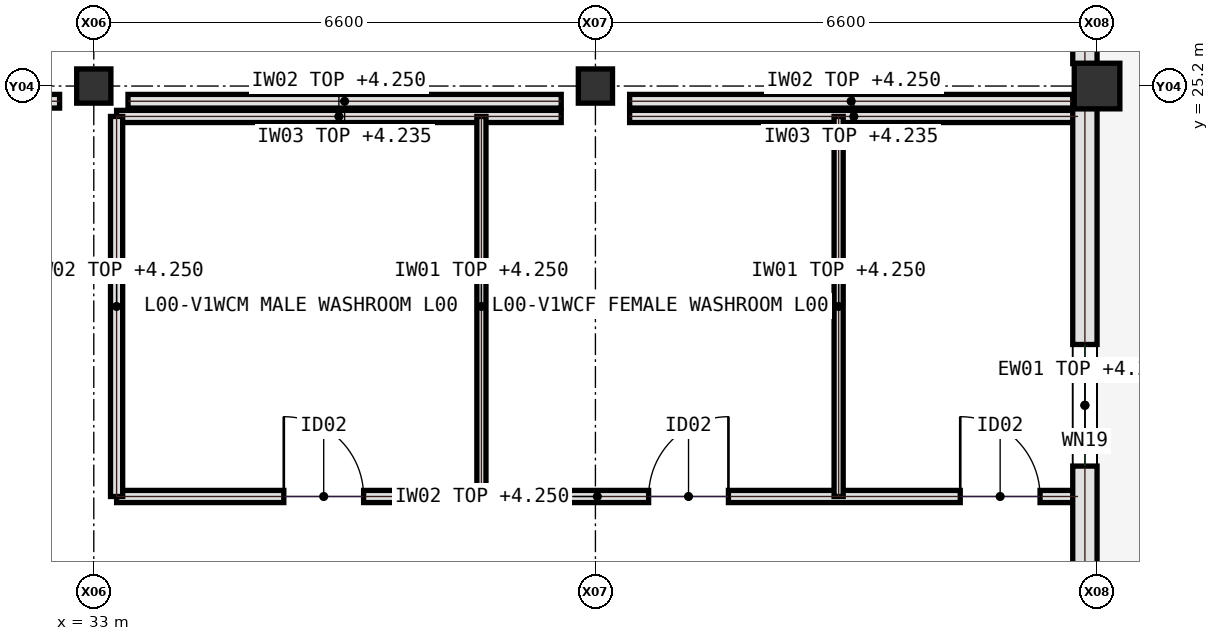
"""IFC4 building model, lengths in metres.
Left out: names, types, materials, properties, quantities, classifications, styles, units other than length and angle.
Written with IfcOpenShell. Run it as: python <this file> out.ifc"""

import sys

from ifc_helpers import new_model, si_unit, direction, frame, frame_2d, origin, origin_2d, place, context, subcontext, project, spatial, rectangle, extrude, element, fill, save


model = new_model("IFC4")
c1 = context("Model", 3, precision=1e-05, world=origin(), true_north=direction((0.0, 1.0)))
c2 = subcontext(c1, "Body", "Model", "MODEL_VIEW")
j1 = project(units=[si_unit("LENGTHUNIT", "METRE"), si_unit("PLANEANGLEUNIT", "RADIAN")], contexts=[c1])
p1 = place(None, origin())
s1 = spatial("IfcSite", under=j1, at=p1, CompositionType="ELEMENT")
p2 = place(p1, origin())
s2 = spatial("IfcBuilding", under=s1, at=p2, CompositionType="ELEMENT")
p3 = place(p2, origin())
s3 = spatial("IfcBuildingStorey", under=s2, at=p3, CompositionType="ELEMENT", Elevation=0.0)
for number, where, z_axis, x_axis in (
    (1, (33.0, 25.2, 0.0), (0.0, 0.0, 1.0), (1.0, 0.0, 0.0)),
    (2, (39.6, 25.2, 0.0), (0.0, 0.0, 1.0), (1.0, 0.0, 0.0)),
):
    element("IfcColumn", number, at=place(p3, frame(where, z_axis=z_axis, x_axis=x_axis)), inside=s3, PredefinedType="COLUMN", context=c2, shape_type="SweptSolid", body=[
        extrude(rectangle(XDim=0.45, YDim=0.45, at=origin_2d()), origin(), (0.0, 0.0, 1.0), 5.4),
    ])
p4 = place(p3, frame((46.2, 25.2, 0.0), z_axis=(0.0, 0.0, 1.0), x_axis=(1.0, 0.0, 0.0)))
e3 = element("IfcColumn", 3, at=p4, inside=s3, PredefinedType="COLUMN", context=c2, shape_type="SweptSolid", body=[
    extrude(rectangle(XDim=0.6, YDim=0.6, at=origin_2d()), origin(), (0.0, 0.0, 1.0), 5.4),
])
p5 = place(p3, frame((33.3, 19.8, 0.0), z_axis=(0.0, 0.0, 1.0), x_axis=(1.0, 0.0, 0.0)))
e4 = element("IfcWall", 4, at=p5, inside=s3, PredefinedType="PARTITIONING", context=c2, shape_type="SweptSolid", body=[
    extrude(rectangle(XDim=12.65, YDim=0.16, at=frame_2d((6.325, 0.0))), origin(), (0.0, 0.0, 1.0), 4.25),
])
p6 = place(p5, frame((2.2, 0.0, 0.0)))
e5 = element("IfcOpeningElement", 5, at=p6, cuts=e4, PredefinedType="OPENING", context=c2, shape_type="SweptSolid", body=[
    extrude(rectangle(XDim=1.05, YDim=2.15, at=frame_2d((0.525, 1.075))), frame((0.0, 0.09, 0.0), z_axis=(0.0, -1.0, 0.0), x_axis=(1.0, 0.0, 0.0)), (0.0, 0.0, 1.0), 0.18),
])
p7 = place(p5, frame((7.0, 0.0, 0.0)))
e6 = element("IfcOpeningElement", 6, at=p7, cuts=e4, PredefinedType="OPENING", context=c2, shape_type="SweptSolid", body=[
    extrude(rectangle(XDim=1.05, YDim=2.15, at=frame_2d((0.525, 1.075))), frame((0.0, 0.09, 0.0), z_axis=(0.0, -1.0, 0.0), x_axis=(1.0, 0.0, 0.0)), (0.0, 0.0, 1.0), 0.18),
])
p8 = place(p5, frame((11.1, 0.0, 0.0)))
e7 = element("IfcOpeningElement", 7, at=p8, cuts=e4, PredefinedType="OPENING", context=c2, shape_type="SweptSolid", body=[
    extrude(rectangle(XDim=1.05, YDim=2.15, at=frame_2d((0.525, 1.075))), frame((0.0, 0.09, 0.0), z_axis=(0.0, -1.0, 0.0), x_axis=(1.0, 0.0, 0.0)), (0.0, 0.0, 1.0), 0.18),
])
p9 = place(p3, frame((33.3, 24.8, 0.0), z_axis=(0.0, 0.0, 1.0), x_axis=(1.0, 0.0, 0.0)))
e8 = element("IfcWall", 8, at=p9, inside=s3, PredefinedType="PARTITIONING", context=c2, shape_type="SweptSolid", body=[
    extrude(rectangle(XDim=5.85, YDim=0.16, at=frame_2d((2.925, 0.0))), origin(), (0.0, 0.0, 1.0), 4.25),
])
p10 = place(p3, frame((40.05, 24.8, 0.0), z_axis=(0.0, 0.0, 1.0), x_axis=(1.0, 0.0, 0.0)))
e9 = element("IfcWall", 9, at=p10, inside=s3, PredefinedType="PARTITIONING", context=c2, shape_type="SweptSolid", body=[
    extrude(rectangle(XDim=5.9, YDim=0.16, at=frame_2d((2.95, 0.0))), origin(), (0.0, 0.0, 1.0), 4.25),
])
p11 = place(p3, frame((33.3, 19.8, 0.0), z_axis=(0.0, 0.0, 1.0), x_axis=(0.0, 1.0, 0.0)))
e10 = element("IfcWall", 10, at=p11, inside=s3, PredefinedType="PARTITIONING", context=c2, shape_type="SweptSolid", body=[
    extrude(rectangle(XDim=5.0, YDim=0.16, at=frame_2d((2.5, 0.0))), origin(), (0.0, 0.0, 1.0), 4.25),
])
for number, where, z_axis, x_axis in (
    (11, (38.1, 19.8, 0.0), (0.0, 0.0, 1.0), (0.0, 1.0, 0.0)),
    (12, (42.8, 19.8, 0.0), (0.0, 0.0, 1.0), (0.0, 1.0, 0.0)),
):
    element("IfcWall", number, at=place(p3, frame(where, z_axis=z_axis, x_axis=x_axis)), inside=s3, PredefinedType="PARTITIONING", context=c2, shape_type="SweptSolid", body=[
        extrude(rectangle(XDim=5.0, YDim=0.12, at=frame_2d((2.5, 0.0))), origin(), (0.0, 0.0, 1.0), 4.25),
    ])
p12 = place(p3, frame((26.85, 25.0, 0.0), z_axis=(0.0, 0.0, 1.0), x_axis=(1.0, 0.0, 0.0)))
e13 = element("IfcWall", 13, at=p12, inside=s3, PredefinedType="SOLIDWALL", context=c2, shape_type="SweptSolid", body=[
    extrude(rectangle(XDim=5.7, YDim=0.18, at=frame_2d((2.85, 0.0))), origin(), (0.0, 0.0, 1.0), 4.235),
])
p13 = place(p12, frame((2.9, 0.0, 0.0)))
e14 = element("IfcOpeningElement", 14, at=p13, cuts=e13, PredefinedType="OPENING", context=c2, shape_type="SweptSolid", body=[
    extrude(rectangle(XDim=1.85, YDim=2.25, at=frame_2d((0.925, 1.125))), frame((0.0, 0.1, 0.0), z_axis=(0.0, -1.0, 0.0), x_axis=(1.0, 0.0, 0.0)), (0.0, 0.0, 1.0), 0.2),
])
p14 = place(p3, frame((33.45, 25.0, 0.0), z_axis=(0.0, 0.0, 1.0), x_axis=(1.0, 0.0, 0.0)))
e15 = element("IfcWall", 15, at=p14, inside=s3, PredefinedType="SOLIDWALL", context=c2, shape_type="SweptSolid", body=[
    extrude(rectangle(XDim=5.7, YDim=0.18, at=frame_2d((2.85, 0.0))), origin(), (0.0, 0.0, 1.0), 4.235),
])
p15 = place(p3, frame((40.05, 25.0, 0.0), z_axis=(0.0, 0.0, 1.0), x_axis=(1.0, 0.0, 0.0)))
e16 = element("IfcWall", 16, at=p15, inside=s3, PredefinedType="SOLIDWALL", context=c2, shape_type="SweptSolid", body=[
    extrude(rectangle(XDim=5.83, YDim=0.18, at=frame_2d((2.915, 0.0))), origin(), (0.0, 0.0, 1.0), 4.235),
])
p16 = place(p3, frame((46.04, 17.095, 0.0), z_axis=(0.0, 0.0, 1.0), x_axis=(0.0, 1.0, 0.0)))
e17 = element("IfcWall", 17, at=p16, inside=s3, PredefinedType="SOLIDWALL", context=c2, shape_type="SweptSolid", body=[
    extrude(rectangle(XDim=7.81, YDim=0.32, at=frame_2d((3.905, 0.0))), origin(), (0.0, 0.0, 1.0), 4.335),
])
p17 = place(p16, frame((3.105, 0.0, 0.95)))
e18 = element("IfcOpeningElement", 18, at=p17, cuts=e17, PredefinedType="OPENING", context=c2, shape_type="SweptSolid", body=[
    extrude(rectangle(XDim=1.6, YDim=1.85, at=frame_2d((0.8, 0.925))), frame((0.0, 0.17, 0.0), z_axis=(0.0, -1.0, 0.0), x_axis=(1.0, 0.0, 0.0)), (0.0, 0.0, 1.0), 0.34),
])
p18 = place(p3, frame((46.04, 25.495, 0.0), z_axis=(0.0, 0.0, 1.0), x_axis=(0.0, 1.0, 0.0)))
e19 = element("IfcWall", 19, at=p18, inside=s3, PredefinedType="SOLIDWALL", context=c2, shape_type="SweptSolid", body=[
    extrude(rectangle(XDim=7.81, YDim=0.32, at=frame_2d((3.905, 0.0))), origin(), (0.0, 0.0, 1.0), 4.335),
])
p19 = place(p18, frame((2.905, 0.0, 0.0)))
e20 = element("IfcOpeningElement", 20, at=p19, cuts=e19, PredefinedType="OPENING", context=c2, shape_type="SweptSolid", body=[
    extrude(rectangle(XDim=2.0, YDim=2.4, at=frame_2d((1.0, 1.2))), frame((0.0, 0.17, 0.0), z_axis=(0.0, -1.0, 0.0), x_axis=(1.0, 0.0, 0.0)), (0.0, 0.0, 1.0), 0.34),
])
p20 = place(p6, origin())
e21 = element("IfcDoor", 21, at=p20, inside=s3, OperationType="SINGLE_SWING_LEFT", PredefinedType="DOOR", context=c2, shape_type="SweptSolid", body=[
    extrude(rectangle(XDim=1.05, YDim=2.15, at=frame_2d((0.525, 1.075))), frame((0.0, 0.025, 0.0), z_axis=(0.0, -1.0, 0.0), x_axis=(1.0, 0.0, 0.0)), (0.0, 0.0, 1.0), 0.05),
])
fill(e5, e21)
p21 = place(p7, origin())
e22 = element("IfcDoor", 22, at=p21, inside=s3, OperationType="SINGLE_SWING_RIGHT", PredefinedType="DOOR", context=c2, shape_type="SweptSolid", body=[
    extrude(rectangle(XDim=1.05, YDim=2.15, at=frame_2d((0.525, 1.075))), frame((0.0, 0.025, 0.0), z_axis=(0.0, -1.0, 0.0), x_axis=(1.0, 0.0, 0.0)), (0.0, 0.0, 1.0), 0.05),
])
fill(e6, e22)
p22 = place(p8, origin())
e23 = element("IfcDoor", 23, at=p22, inside=s3, OperationType="SINGLE_SWING_LEFT", PredefinedType="DOOR", context=c2, shape_type="SweptSolid", body=[
    extrude(rectangle(XDim=1.05, YDim=2.15, at=frame_2d((0.525, 1.075))), frame((0.0, 0.025, 0.0), z_axis=(0.0, -1.0, 0.0), x_axis=(1.0, 0.0, 0.0)), (0.0, 0.0, 1.0), 0.05),
])
fill(e7, e23)
p23 = place(p17, origin())
e24 = element("IfcWindow", 24, at=p23, inside=s3, PartitioningType="SINGLE_PANEL", PredefinedType="WINDOW", context=c2, shape_type="SweptSolid", body=[
    extrude(rectangle(XDim=1.6, YDim=1.85, at=frame_2d((0.8, 0.925))), frame((0.0, 0.03, 0.0), z_axis=(0.0, -1.0, 0.0), x_axis=(1.0, 0.0, 0.0)), (0.0, 0.0, 1.0), 0.06),
])
fill(e18, e24)
save(model, sys.argv[1])
